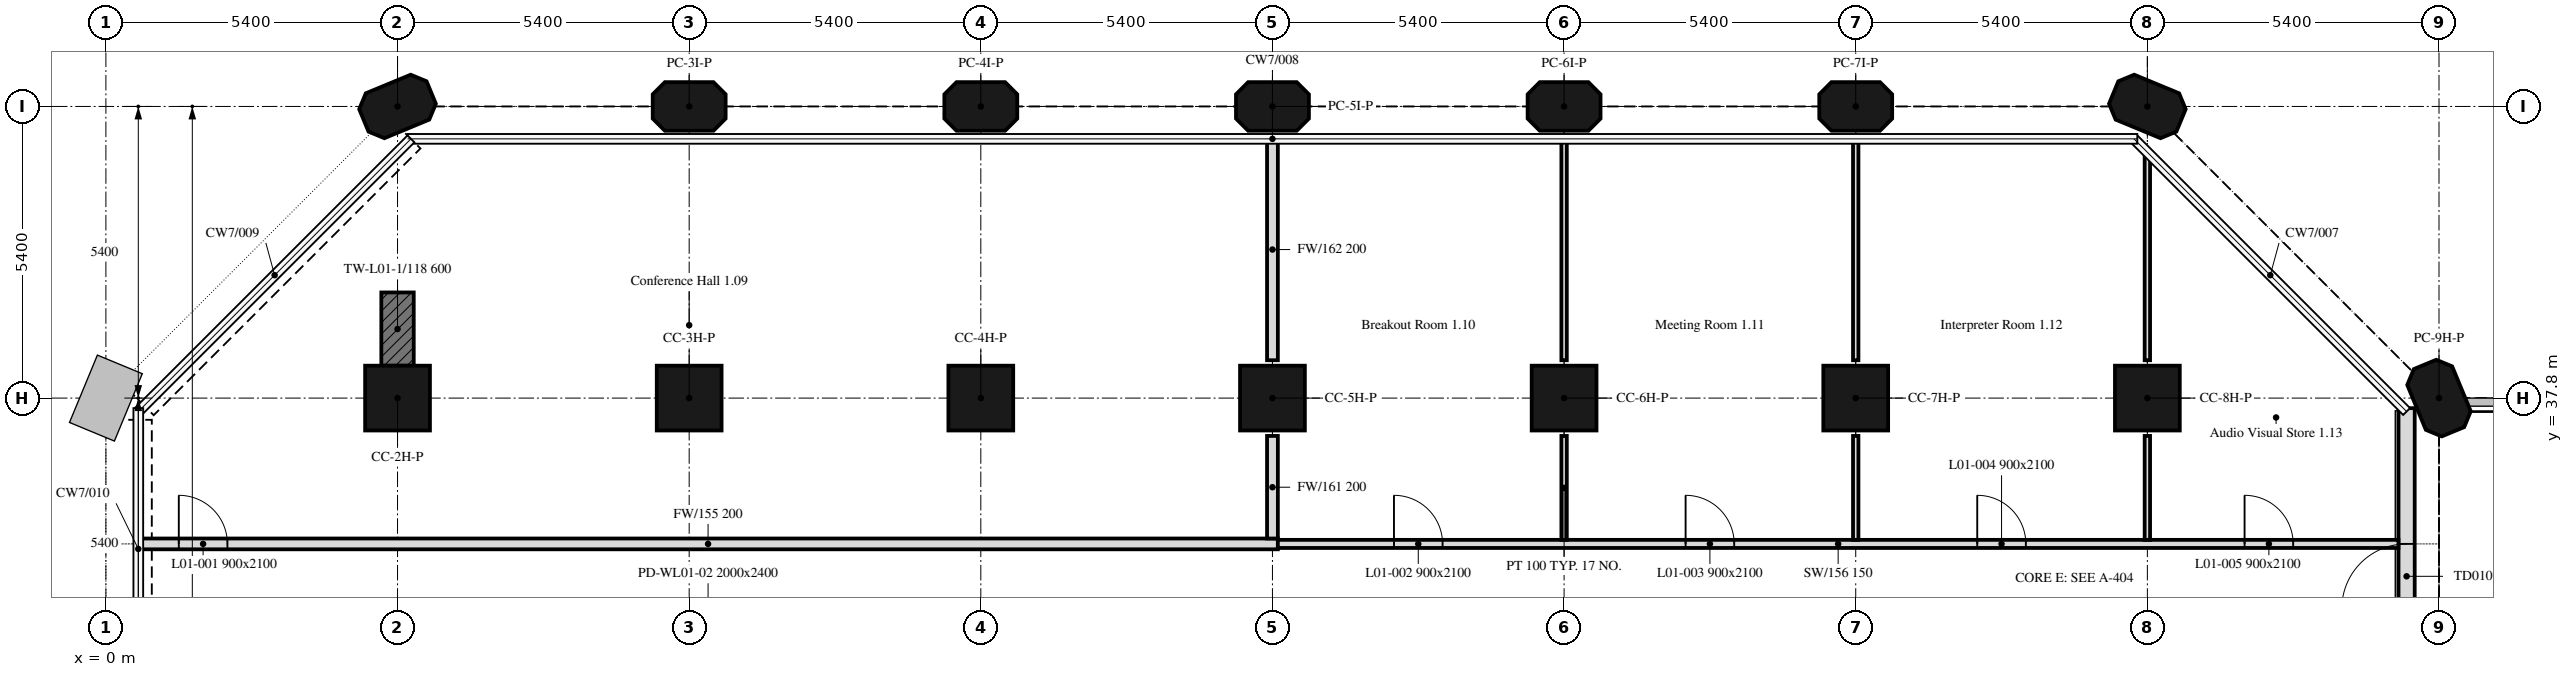
"""IFC4 building model, lengths in metres.
Left out: names, types, materials, properties, quantities, classifications, styles, units other than length and angle.
Written with IfcOpenShell. Run it as: python <this file> out.ifc"""

import sys

from ifc_helpers import new_model, si_unit, direction, frame, frame_2d, origin, origin_2d, place, context, subcontext, project, spatial, polyline, rectangle, outline, extrude, element, fill, save


model = new_model("IFC4")
c1 = context("Model", 3, precision=1e-05, world=origin(), true_north=direction((0.0, 1.0)))
c2 = subcontext(c1, "Body", "Model", "MODEL_VIEW")
j1 = project(units=[si_unit("LENGTHUNIT", "METRE"), si_unit("PLANEANGLEUNIT", "RADIAN")], contexts=[c1])
p1 = place(None, origin())
s1 = spatial("IfcSite", under=j1, at=p1, CompositionType="ELEMENT")
p2 = place(p1, origin())
s2 = spatial("IfcBuilding", under=s1, at=p2, CompositionType="ELEMENT")
p3 = place(p2, frame((0.0, 0.0, 8.4)))
s3 = spatial("IfcBuildingStorey", under=s2, at=p3, CompositionType="ELEMENT", Elevation=8.4)
for number, where, z_axis, x_axis in (
    (1, (5.4, 37.8, 0.0), (0.0, 0.0, 1.0), (1.0, 0.0, 0.0)),
    (2, (10.8, 37.8, 0.0), (0.0, 0.0, 1.0), (1.0, 0.0, 0.0)),
    (3, (16.2, 37.8, 0.0), (0.0, 0.0, 1.0), (1.0, 0.0, 0.0)),
    (4, (21.6, 37.8, 0.0), (0.0, 0.0, 1.0), (1.0, 0.0, 0.0)),
    (5, (27.0, 37.8, 0.0), (0.0, 0.0, 1.0), (1.0, 0.0, 0.0)),
    (6, (32.4, 37.8, 0.0), (0.0, 0.0, 1.0), (1.0, 0.0, 0.0)),
    (7, (37.8, 37.8, 0.0), (0.0, 0.0, 1.0), (1.0, 0.0, 0.0)),
):
    element("IfcColumn", number, at=place(p3, frame(where, z_axis=z_axis, x_axis=x_axis)), inside=s3, PredefinedType="COLUMN", context=c2, shape_type="SweptSolid", body=[
        extrude(rectangle(XDim=1.2, YDim=1.2, at=origin_2d()), origin(), (0.0, 0.0, 1.0), 5.6),
    ])
for number, where, z_axis, x_axis in (
    (8, (43.2, 37.8, 0.0), (0.0, 0.0, 1.0), (-0.383, 0.924, 0.0)),
    (9, (5.4, 43.2, 0.0), (0.0, 0.0, 1.0), (0.924, 0.383, 0.0)),
    (10, (10.8, 43.2, 0.0), (0.0, 0.0, 1.0), (1.0, 0.0, 0.0)),
    (11, (16.2, 43.2, 0.0), (0.0, 0.0, 1.0), (1.0, 0.0, 0.0)),
    (12, (21.6, 43.2, 0.0), (0.0, 0.0, 1.0), (1.0, 0.0, 0.0)),
    (13, (27.0, 43.2, 0.0), (0.0, 0.0, 1.0), (1.0, 0.0, 0.0)),
    (14, (32.4, 43.2, 0.0), (0.0, 0.0, 1.0), (1.0, 0.0, 0.0)),
    (15, (37.8, 43.2, 0.0), (0.0, 0.0, 1.0), (-0.924, 0.383, 0.0)),
):
    element("IfcColumn", number, at=place(p3, frame(where, z_axis=z_axis, x_axis=x_axis)), inside=s3, PredefinedType="COLUMN", context=c2, shape_type="SweptSolid", body=[
        extrude(outline(polyline([(-0.45, -0.45), (0.45, -0.45), (0.675, -0.225), (0.675, 0.225), (0.45, 0.45), (-0.45, 0.45), (-0.675, 0.225), (-0.675, -0.225), (-0.45, -0.45)])), origin(), (0.0, 0.0, 1.0), 5.6),
    ])
p4 = place(p3, frame((5.4, 38.4, 0.0), z_axis=(0.0, 0.0, 1.0), x_axis=(0.0, 1.0, 0.0)))
e16 = element("IfcWall", 16, at=p4, inside=s3, PredefinedType="SHEAR", context=c2, shape_type="SweptSolid", body=[
    extrude(rectangle(XDim=1.356, YDim=0.6, at=frame_2d((0.678, 0.0))), origin(), (0.0, 0.0, 1.0), 5.6),
])
p5 = place(p3, frame((42.6, 32.4, 0.0), z_axis=(0.0, 0.0, 1.0), x_axis=(0.0, 1.0, 0.0)))
e17 = element("IfcWall", 17, at=p5, inside=s3, PredefinedType="SOLIDWALL", context=c2, shape_type="SweptSolid", body=[
    extrude(rectangle(XDim=5.214, YDim=0.3, at=frame_2d((2.607, 0.0))), origin(), (0.0, 0.0, 1.0), 5.6),
])
p6 = place(p5, frame((1.5, 0.0, 0.0)))
e18 = element("IfcOpeningElement", 18, at=p6, cuts=e17, PredefinedType="OPENING", context=c2, shape_type="SweptSolid", body=[
    extrude(rectangle(XDim=1.2, YDim=2.4, at=frame_2d((0.6, 1.2))), frame((0.0, 0.16, 0.0), z_axis=(0.0, -1.0, 0.0), x_axis=(1.0, 0.0, 0.0)), (0.0, 0.0, 1.0), 0.32),
])
p7 = place(p3, frame((0.6, 35.1, 0.0), z_axis=(0.0, 0.0, 1.0), x_axis=(1.0, 0.0, 0.0)))
e19 = element("IfcWall", 19, at=p7, inside=s3, PredefinedType="PARTITIONING", context=c2, shape_type="SweptSolid", body=[
    extrude(rectangle(XDim=21.1, YDim=0.2, at=frame_2d((10.55, 0.0))), origin(), (0.0, 0.0, 1.0), 4.85),
])
p8 = place(p7, frame((0.75, 0.0, 0.0)))
e20 = element("IfcOpeningElement", 20, at=p8, cuts=e19, PredefinedType="OPENING", context=c2, shape_type="SweptSolid", body=[
    extrude(rectangle(XDim=0.9, YDim=2.1, at=frame_2d((0.45, 1.05))), frame((0.0, 0.1, 0.0), z_axis=(0.0, -1.0, 0.0), x_axis=(1.0, 0.0, 0.0)), (0.0, 0.0, 1.0), 0.2),
])
p9 = place(p3, frame((21.7, 35.1, 0.0), z_axis=(0.0, 0.0, 1.0), x_axis=(1.0, 0.0, 0.0)))
e21 = element("IfcWall", 21, at=p9, inside=s3, PredefinedType="PARTITIONING", context=c2, shape_type="SweptSolid", body=[
    extrude(rectangle(XDim=20.749, YDim=0.15, at=frame_2d((10.375, 0.0))), origin(), (0.0, 0.0, 1.0), 4.85),
])
p10 = place(p9, frame((2.15, 0.0, 0.0)))
e22 = element("IfcOpeningElement", 22, at=p10, cuts=e21, PredefinedType="OPENING", context=c2, shape_type="SweptSolid", body=[
    extrude(rectangle(XDim=0.9, YDim=2.1, at=frame_2d((0.45, 1.05))), frame((0.0, 0.075, 0.0), z_axis=(0.0, -1.0, 0.0), x_axis=(1.0, 0.0, 0.0)), (0.0, 0.0, 1.0), 0.15),
])
p11 = place(p9, frame((7.55, 0.0, 0.0)))
e23 = element("IfcOpeningElement", 23, at=p11, cuts=e21, PredefinedType="OPENING", context=c2, shape_type="SweptSolid", body=[
    extrude(rectangle(XDim=0.9, YDim=2.1, at=frame_2d((0.45, 1.05))), frame((0.0, 0.075, 0.0), z_axis=(0.0, -1.0, 0.0), x_axis=(1.0, 0.0, 0.0)), (0.0, 0.0, 1.0), 0.15),
])
p12 = place(p9, frame((12.95, 0.0, 0.0)))
e24 = element("IfcOpeningElement", 24, at=p12, cuts=e21, PredefinedType="OPENING", context=c2, shape_type="SweptSolid", body=[
    extrude(rectangle(XDim=0.9, YDim=2.1, at=frame_2d((0.45, 1.05))), frame((0.0, 0.075, 0.0), z_axis=(0.0, -1.0, 0.0), x_axis=(1.0, 0.0, 0.0)), (0.0, 0.0, 1.0), 0.15),
])
p13 = place(p9, frame((17.9, 0.0, 0.0)))
e25 = element("IfcOpeningElement", 25, at=p13, cuts=e21, PredefinedType="OPENING", context=c2, shape_type="SweptSolid", body=[
    extrude(rectangle(XDim=0.9, YDim=2.1, at=frame_2d((0.45, 1.05))), frame((0.0, 0.075, 0.0), z_axis=(0.0, -1.0, 0.0), x_axis=(1.0, 0.0, 0.0)), (0.0, 0.0, 1.0), 0.15),
])
p14 = place(p3, frame((21.6, 35.2, 0.0), z_axis=(0.0, 0.0, 1.0), x_axis=(0.0, 1.0, 0.0)))
e26 = element("IfcWall", 26, at=p14, inside=s3, PredefinedType="PARTITIONING", context=c2, shape_type="SweptSolid", body=[
    extrude(rectangle(XDim=1.899, YDim=0.2, at=frame_2d((0.95, 0.0))), origin(), (0.0, 0.0, 1.0), 4.85),
])
p15 = place(p3, frame((21.6, 38.501, 0.0), z_axis=(0.0, 0.0, 1.0), x_axis=(0.0, 1.0, 0.0)))
e27 = element("IfcWall", 27, at=p15, inside=s3, PredefinedType="PARTITIONING", context=c2, shape_type="SweptSolid", body=[
    extrude(rectangle(XDim=4.099, YDim=0.2, at=frame_2d((2.05, 0.0))), origin(), (0.0, 0.0, 1.0), 4.85),
])
p16 = place(p3, frame((27.0, 35.175, 0.0), z_axis=(0.0, 0.0, 1.0), x_axis=(0.0, 1.0, 0.0)))
e28 = element("IfcWall", 28, at=p16, inside=s3, PredefinedType="PARTITIONING", context=c2, shape_type="SweptSolid", body=[
    extrude(rectangle(XDim=1.924, YDim=0.1, at=frame_2d((0.962, 0.0))), origin(), (0.0, 0.0, 1.0), 4.85),
])
p17 = place(p3, frame((27.0, 38.501, 0.0), z_axis=(0.0, 0.0, 1.0), x_axis=(0.0, 1.0, 0.0)))
e29 = element("IfcWall", 29, at=p17, inside=s3, PredefinedType="PARTITIONING", context=c2, shape_type="SweptSolid", body=[
    extrude(rectangle(XDim=4.099, YDim=0.1, at=frame_2d((2.05, 0.0))), origin(), (0.0, 0.0, 1.0), 4.85),
])
p18 = place(p3, frame((32.4, 35.175, 0.0), z_axis=(0.0, 0.0, 1.0), x_axis=(0.0, 1.0, 0.0)))
e30 = element("IfcWall", 30, at=p18, inside=s3, PredefinedType="PARTITIONING", context=c2, shape_type="SweptSolid", body=[
    extrude(rectangle(XDim=1.924, YDim=0.1, at=frame_2d((0.962, 0.0))), origin(), (0.0, 0.0, 1.0), 4.85),
])
p19 = place(p3, frame((32.4, 38.501, 0.0), z_axis=(0.0, 0.0, 1.0), x_axis=(0.0, 1.0, 0.0)))
e31 = element("IfcWall", 31, at=p19, inside=s3, PredefinedType="PARTITIONING", context=c2, shape_type="SweptSolid", body=[
    extrude(rectangle(XDim=4.099, YDim=0.1, at=frame_2d((2.05, 0.0))), origin(), (0.0, 0.0, 1.0), 4.85),
])
p20 = place(p3, frame((37.8, 35.175, 0.0), z_axis=(0.0, 0.0, 1.0), x_axis=(0.0, 1.0, 0.0)))
e32 = element("IfcWall", 32, at=p20, inside=s3, PredefinedType="PARTITIONING", context=c2, shape_type="SweptSolid", body=[
    extrude(rectangle(XDim=1.924, YDim=0.1, at=frame_2d((0.962, 0.0))), origin(), (0.0, 0.0, 1.0), 5.6),
])
p21 = place(p3, frame((37.8, 38.501, 0.0), z_axis=(0.0, 0.0, 1.0), x_axis=(0.0, 1.0, 0.0)))
e33 = element("IfcWall", 33, at=p21, inside=s3, PredefinedType="PARTITIONING", context=c2, shape_type="SweptSolid", body=[
    extrude(rectangle(XDim=3.801, YDim=0.1, at=frame_2d((1.9, 0.0))), origin(), (0.0, 0.0, 1.0), 5.6),
])
p22 = place(p6, origin())
e34 = element("IfcDoor", 34, at=p22, inside=s3, OperationType="SINGLE_SWING_LEFT", PredefinedType="DOOR", context=c2, shape_type="SweptSolid", body=[
    extrude(rectangle(XDim=1.2, YDim=2.4, at=frame_2d((0.6, 1.2))), frame((0.0, 0.025, 0.0), z_axis=(0.0, -1.0, 0.0), x_axis=(1.0, 0.0, 0.0)), (0.0, 0.0, 1.0), 0.05),
])
fill(e18, e34)
p23 = place(p8, origin())
e35 = element("IfcDoor", 35, at=p23, inside=s3, OperationType="SINGLE_SWING_RIGHT", PredefinedType="DOOR", context=c2, shape_type="SweptSolid", body=[
    extrude(rectangle(XDim=0.9, YDim=2.1, at=frame_2d((0.45, 1.05))), frame((0.0, 0.025, 0.0), z_axis=(0.0, -1.0, 0.0), x_axis=(1.0, 0.0, 0.0)), (0.0, 0.0, 1.0), 0.05),
])
fill(e20, e35)
p24 = place(p10, origin())
e36 = element("IfcDoor", 36, at=p24, inside=s3, OperationType="SINGLE_SWING_RIGHT", PredefinedType="DOOR", context=c2, shape_type="SweptSolid", body=[
    extrude(rectangle(XDim=0.9, YDim=2.1, at=frame_2d((0.45, 1.05))), frame((0.0, 0.025, 0.0), z_axis=(0.0, -1.0, 0.0), x_axis=(1.0, 0.0, 0.0)), (0.0, 0.0, 1.0), 0.05),
])
fill(e22, e36)
p25 = place(p11, origin())
e37 = element("IfcDoor", 37, at=p25, inside=s3, OperationType="SINGLE_SWING_RIGHT", PredefinedType="DOOR", context=c2, shape_type="SweptSolid", body=[
    extrude(rectangle(XDim=0.9, YDim=2.1, at=frame_2d((0.45, 1.05))), frame((0.0, 0.025, 0.0), z_axis=(0.0, -1.0, 0.0), x_axis=(1.0, 0.0, 0.0)), (0.0, 0.0, 1.0), 0.05),
])
fill(e23, e37)
p26 = place(p12, origin())
e38 = element("IfcDoor", 38, at=p26, inside=s3, OperationType="SINGLE_SWING_LEFT", PredefinedType="DOOR", context=c2, shape_type="SweptSolid", body=[
    extrude(rectangle(XDim=0.9, YDim=2.1, at=frame_2d((0.45, 1.05))), frame((0.0, 0.025, 0.0), z_axis=(0.0, -1.0, 0.0), x_axis=(1.0, 0.0, 0.0)), (0.0, 0.0, 1.0), 0.05),
])
fill(e24, e38)
p27 = place(p13, origin())
e39 = element("IfcDoor", 39, at=p27, inside=s3, OperationType="SINGLE_SWING_LEFT", PredefinedType="DOOR", context=c2, shape_type="SweptSolid", body=[
    extrude(rectangle(XDim=0.9, YDim=2.1, at=frame_2d((0.45, 1.05))), frame((0.0, 0.025, 0.0), z_axis=(0.0, -1.0, 0.0), x_axis=(1.0, 0.0, 0.0)), (0.0, 0.0, 1.0), 0.05),
])
fill(e25, e39)
save(model, sys.argv[1])
